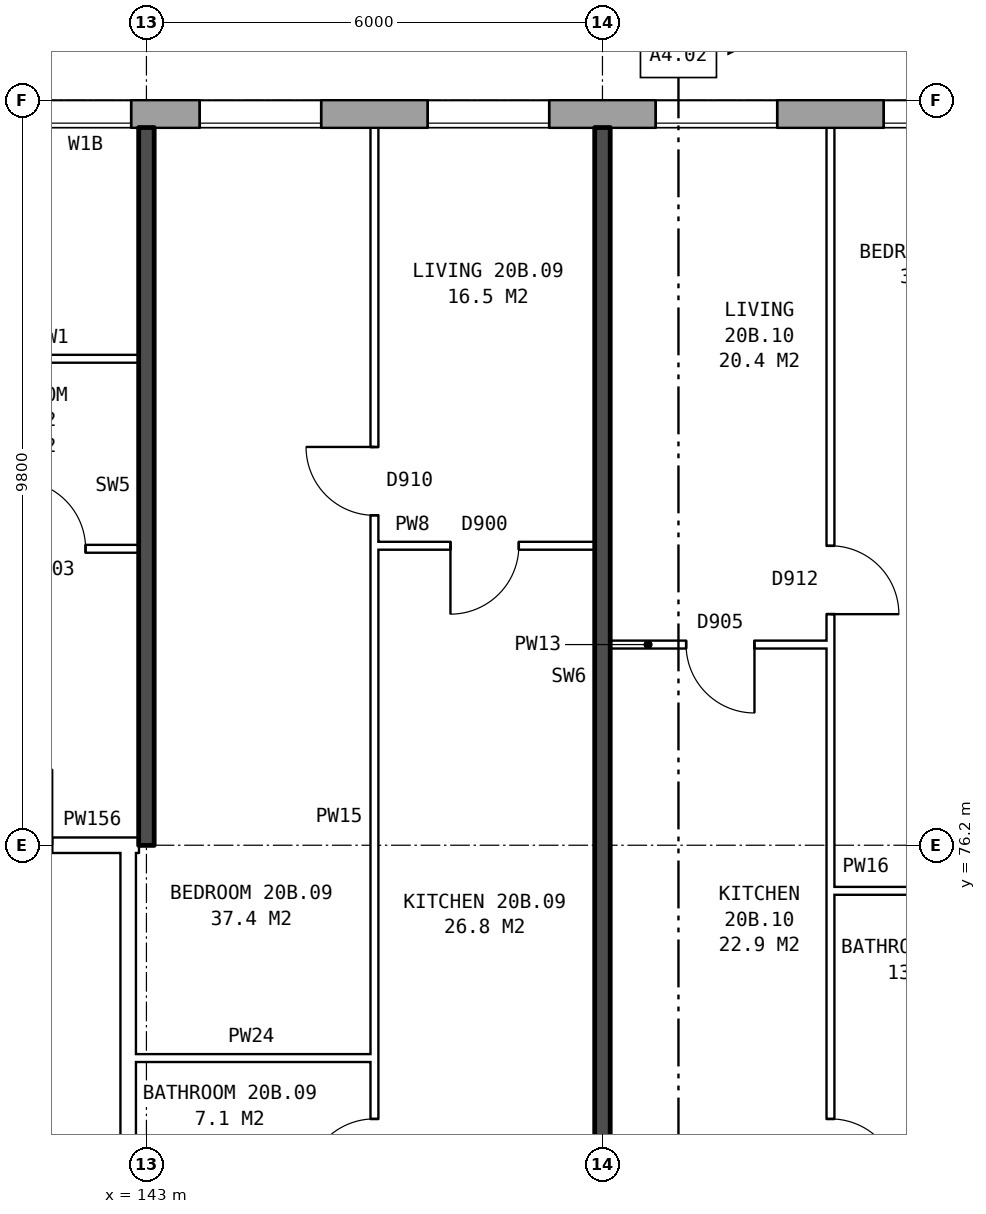
"""IFC4 building model, lengths in metres.
Left out: names, types, materials, properties, quantities, classifications, styles, units other than length and angle.
Written with IfcOpenShell. Run it as: python <this file> out.ifc"""

import sys

from ifc_helpers import new_model, si_unit, direction, frame, frame_2d, origin, place, context, subcontext, project, spatial, rectangle, extrude, element, fill, save


model = new_model("IFC4")
c1 = context("Model", 3, precision=1e-05, world=origin(), true_north=direction((0.0, 1.0)))
c2 = subcontext(c1, "Body", "Model", "MODEL_VIEW")
j1 = project(units=[si_unit("LENGTHUNIT", "METRE"), si_unit("PLANEANGLEUNIT", "RADIAN")], contexts=[c1])
p1 = place(None, origin())
s1 = spatial("IfcSite", under=j1, at=p1, CompositionType="ELEMENT")
p2 = place(p1, origin())
s2 = spatial("IfcBuilding", under=s1, at=p2, CompositionType="ELEMENT")
p3 = place(p2, frame((0.0, 0.0, 74.7)))
s3 = spatial("IfcBuildingStorey", under=s2, at=p3, CompositionType="ELEMENT", Elevation=74.7)
p4 = place(p3, frame((172.175, 85.82, 0.0), z_axis=(0.0, 0.0, 1.0), x_axis=(-1.0, 0.0, 0.0)))
e1 = element("IfcWall", 1, at=p4, inside=s3, PredefinedType="STANDARD", context=c2, shape_type="SweptSolid", body=[
    extrude(rectangle(XDim=38.101, YDim=0.36, at=frame_2d((19.05, 0.0))), origin(), (0.0, 0.0, 1.0), 2.85),
])
p5 = place(p4, frame((2.875, 0.0, 0.8)))
e2 = element("IfcOpeningElement", 2, at=p5, cuts=e1, PredefinedType="OPENING", context=c2, shape_type="SweptSolid", body=[
    extrude(rectangle(XDim=1.6, YDim=1.8, at=frame_2d((0.8, 0.9))), frame((0.0, 0.19, 0.0), z_axis=(0.0, -1.0, 0.0), x_axis=(1.0, 0.0, 0.0)), (0.0, 0.0, 1.0), 0.38),
])
p6 = place(p4, frame((6.525, 0.0, 0.8)))
e3 = element("IfcOpeningElement", 3, at=p6, cuts=e1, PredefinedType="OPENING", context=c2, shape_type="SweptSolid", body=[
    extrude(rectangle(XDim=0.6, YDim=0.9, at=frame_2d((0.3, 0.45))), frame((0.0, 0.19, 0.0), z_axis=(0.0, -1.0, 0.0), x_axis=(1.0, 0.0, 0.0)), (0.0, 0.0, 1.0), 0.38),
])
p7 = place(p4, frame((8.875, 0.0, 0.8)))
e4 = element("IfcOpeningElement", 4, at=p7, cuts=e1, PredefinedType="OPENING", context=c2, shape_type="SweptSolid", body=[
    extrude(rectangle(XDim=1.6, YDim=1.8, at=frame_2d((0.8, 0.9))), frame((0.0, 0.19, 0.0), z_axis=(0.0, -1.0, 0.0), x_axis=(1.0, 0.0, 0.0)), (0.0, 0.0, 1.0), 0.38),
])
p8 = place(p4, frame((11.875, 0.0, 0.8)))
e5 = element("IfcOpeningElement", 5, at=p8, cuts=e1, PredefinedType="OPENING", context=c2, shape_type="SweptSolid", body=[
    extrude(rectangle(XDim=1.6, YDim=1.8, at=frame_2d((0.8, 0.9))), frame((0.0, 0.19, 0.0), z_axis=(0.0, -1.0, 0.0), x_axis=(1.0, 0.0, 0.0)), (0.0, 0.0, 1.0), 0.38),
])
p9 = place(p4, frame((14.875, 0.0, 0.8)))
e6 = element("IfcOpeningElement", 6, at=p9, cuts=e1, PredefinedType="OPENING", context=c2, shape_type="SweptSolid", body=[
    extrude(rectangle(XDim=1.6, YDim=1.8, at=frame_2d((0.8, 0.9))), frame((0.0, 0.19, 0.0), z_axis=(0.0, -1.0, 0.0), x_axis=(1.0, 0.0, 0.0)), (0.0, 0.0, 1.0), 0.38),
])
p10 = place(p4, frame((17.875, 0.0, 0.8)))
e7 = element("IfcOpeningElement", 7, at=p10, cuts=e1, PredefinedType="OPENING", context=c2, shape_type="SweptSolid", body=[
    extrude(rectangle(XDim=1.6, YDim=1.8, at=frame_2d((0.8, 0.9))), frame((0.0, 0.19, 0.0), z_axis=(0.0, -1.0, 0.0), x_axis=(1.0, 0.0, 0.0)), (0.0, 0.0, 1.0), 0.38),
])
p11 = place(p4, frame((20.875, 0.0, 0.8)))
e8 = element("IfcOpeningElement", 8, at=p11, cuts=e1, PredefinedType="OPENING", context=c2, shape_type="SweptSolid", body=[
    extrude(rectangle(XDim=1.6, YDim=1.8, at=frame_2d((0.8, 0.9))), frame((0.0, 0.19, 0.0), z_axis=(0.0, -1.0, 0.0), x_axis=(1.0, 0.0, 0.0)), (0.0, 0.0, 1.0), 0.38),
])
p12 = place(p4, frame((23.875, 0.0, 0.8)))
e9 = element("IfcOpeningElement", 9, at=p12, cuts=e1, PredefinedType="OPENING", context=c2, shape_type="SweptSolid", body=[
    extrude(rectangle(XDim=1.6, YDim=1.8, at=frame_2d((0.8, 0.9))), frame((0.0, 0.19, 0.0), z_axis=(0.0, -1.0, 0.0), x_axis=(1.0, 0.0, 0.0)), (0.0, 0.0, 1.0), 0.38),
])
p13 = place(p4, frame((26.875, 0.0, 0.8)))
e10 = element("IfcOpeningElement", 10, at=p13, cuts=e1, PredefinedType="OPENING", context=c2, shape_type="SweptSolid", body=[
    extrude(rectangle(XDim=1.6, YDim=1.8, at=frame_2d((0.8, 0.9))), frame((0.0, 0.19, 0.0), z_axis=(0.0, -1.0, 0.0), x_axis=(1.0, 0.0, 0.0)), (0.0, 0.0, 1.0), 0.38),
])
p14 = place(p4, frame((29.375, 0.0, 0.8)))
e11 = element("IfcOpeningElement", 11, at=p14, cuts=e1, PredefinedType="OPENING", context=c2, shape_type="SweptSolid", body=[
    extrude(rectangle(XDim=1.2, YDim=1.8, at=frame_2d((0.6, 0.9))), frame((0.0, 0.19, 0.0), z_axis=(0.0, -1.0, 0.0), x_axis=(1.0, 0.0, 0.0)), (0.0, 0.0, 1.0), 0.38),
])
p15 = place(p4, frame((30.875, 0.0, 0.8)))
e12 = element("IfcOpeningElement", 12, at=p15, cuts=e1, PredefinedType="OPENING", context=c2, shape_type="SweptSolid", body=[
    extrude(rectangle(XDim=0.6, YDim=0.9, at=frame_2d((0.3, 0.45))), frame((0.0, 0.19, 0.0), z_axis=(0.0, -1.0, 0.0), x_axis=(1.0, 0.0, 0.0)), (0.0, 0.0, 1.0), 0.38),
])
p16 = place(p4, frame((35.875, 0.0, 0.8)))
e13 = element("IfcOpeningElement", 13, at=p16, cuts=e1, PredefinedType="OPENING", context=c2, shape_type="SweptSolid", body=[
    extrude(rectangle(XDim=1.6, YDim=1.8, at=frame_2d((0.8, 0.9))), frame((0.0, 0.19, 0.0), z_axis=(0.0, -1.0, 0.0), x_axis=(1.0, 0.0, 0.0)), (0.0, 0.0, 1.0), 0.38),
])
p17 = place(p4, frame((7.425, 0.0, 0.8)))
e14 = element("IfcOpeningElement", 14, at=p17, cuts=e1, PredefinedType="OPENING", context=c2, shape_type="SweptSolid", body=[
    extrude(rectangle(XDim=1.0, YDim=1.8, at=frame_2d((0.5, 0.9))), frame((0.0, 0.19, 0.0), z_axis=(0.0, -1.0, 0.0), x_axis=(1.0, 0.0, 0.0)), (0.0, 0.0, 1.0), 0.38),
])
p18 = place(p4, frame((32.725, 0.0, 1.7)))
e15 = element("IfcOpeningElement", 15, at=p18, cuts=e1, PredefinedType="OPENING", context=c2, shape_type="SweptSolid", body=[
    extrude(rectangle(XDim=0.6, YDim=0.9, at=frame_2d((0.3, 0.45))), frame((0.0, 0.19, 0.0), z_axis=(0.0, -1.0, 0.0), x_axis=(1.0, 0.0, 0.0)), (0.0, 0.0, 1.0), 0.38),
])
p19 = place(p4, frame((33.625, 0.0, 0.8)))
e16 = element("IfcOpeningElement", 16, at=p19, cuts=e1, PredefinedType="OPENING", context=c2, shape_type="SweptSolid", body=[
    extrude(rectangle(XDim=1.2, YDim=1.8, at=frame_2d((0.6, 0.9))), frame((0.0, 0.19, 0.0), z_axis=(0.0, -1.0, 0.0), x_axis=(1.0, 0.0, 0.0)), (0.0, 0.0, 1.0), 0.38),
])
p20 = place(p3, frame((142.76, 63.9, 0.0), z_axis=(0.0, 0.0, 1.0), x_axis=(0.0, 1.0, 0.0)))
e17 = element("IfcWall", 17, at=p20, inside=s3, PredefinedType="PARTITIONING", context=c2, shape_type="SweptSolid", body=[
    extrude(rectangle(XDim=12.2, YDim=0.2, at=frame_2d((6.1, 0.0))), origin(), (0.0, 0.0, 1.0), 2.85),
])
p21 = place(p20, frame((5.1, 0.0, 0.0)))
e18 = element("IfcOpeningElement", 18, at=p21, cuts=e17, PredefinedType="OPENING", context=c2, shape_type="SweptSolid", body=[
    extrude(rectangle(XDim=2.0, YDim=2.1, at=frame_2d((1.0, 1.05))), frame((0.0, 0.11, 0.0), z_axis=(0.0, -1.0, 0.0), x_axis=(1.0, 0.0, 0.0)), (0.0, 0.0, 1.0), 0.22),
])
p22 = place(p3, frame((142.76, 73.4, 0.0), z_axis=(0.0, 0.0, 1.0), x_axis=(1.0, 0.0, 0.0)))
e19 = element("IfcWall", 19, at=p22, inside=s3, PredefinedType="PARTITIONING", context=c2, shape_type="SweptSolid", body=[
    extrude(rectangle(XDim=3.24, YDim=0.1, at=frame_2d((1.62, 0.0))), origin(), (0.0, 0.0, 1.0), 2.85),
])
p23 = place(p3, frame((152.0, 75.6, 0.0), z_axis=(0.0, 0.0, 1.0), x_axis=(1.0, 0.0, 0.0)))
e20 = element("IfcWall", 20, at=p23, inside=s3, PredefinedType="PARTITIONING", context=c2, shape_type="SweptSolid", body=[
    extrude(rectangle(XDim=2.9, YDim=0.1, at=frame_2d((1.45, 0.0))), origin(), (0.0, 0.0, 1.0), 2.85),
])
p24 = place(p3, frame((139.76, 76.2, 0.0), z_axis=(0.0, 0.0, 1.0), x_axis=(1.0, 0.0, 0.0)))
e21 = element("IfcWall", 21, at=p24, inside=s3, PredefinedType="PARTITIONING", context=c2, shape_type="SweptSolid", body=[
    extrude(rectangle(XDim=3.0, YDim=0.2, at=frame_2d((1.5, 0.0))), origin(), (0.0, 0.0, 1.0), 2.85),
])
p25 = place(p24, frame((1.0, 0.0, 0.0)))
e22 = element("IfcOpeningElement", 22, at=p25, cuts=e21, PredefinedType="OPENING", context=c2, shape_type="SweptSolid", body=[
    extrude(rectangle(XDim=1.0, YDim=2.1, at=frame_2d((0.5, 1.05))), frame((0.0, 0.11, 0.0), z_axis=(0.0, -1.0, 0.0), x_axis=(1.0, 0.0, 0.0)), (0.0, 0.0, 1.0), 0.22),
])
p26 = place(p3, frame((142.76, 76.2, 0.0), z_axis=(0.0, 0.0, 1.0), x_axis=(1.0, 0.0, 0.0)))
e23 = element("IfcWall", 23, at=p26, inside=s3, PredefinedType="PARTITIONING", context=c2, shape_type="SweptSolid", body=[
    extrude(rectangle(XDim=0.14, YDim=0.2, at=frame_2d((0.07, 0.0))), origin(), (0.0, 0.0, 1.0), 2.85),
])
p27 = place(p3, frame((149.1, 78.84, 0.0), z_axis=(0.0, 0.0, 1.0), x_axis=(1.0, 0.0, 0.0)))
e24 = element("IfcWall", 24, at=p27, inside=s3, PredefinedType="PARTITIONING", context=c2, shape_type="SweptSolid", body=[
    extrude(rectangle(XDim=2.9, YDim=0.1, at=frame_2d((1.45, 0.0))), origin(), (0.0, 0.0, 1.0), 2.85),
])
p28 = place(p27, frame((1.0, 0.0, 0.0)))
e25 = element("IfcOpeningElement", 25, at=p28, cuts=e24, PredefinedType="OPENING", context=c2, shape_type="SweptSolid", body=[
    extrude(rectangle(XDim=0.9, YDim=2.1, at=frame_2d((0.45, 1.05))), frame((0.0, 0.06, 0.0), z_axis=(0.0, -1.0, 0.0), x_axis=(1.0, 0.0, 0.0)), (0.0, 0.0, 1.0), 0.12),
])
p29 = place(p3, frame((137.1, 80.1, 0.0), z_axis=(0.0, 0.0, 1.0), x_axis=(1.0, 0.0, 0.0)))
e26 = element("IfcWall", 26, at=p29, inside=s3, PredefinedType="PARTITIONING", context=c2, shape_type="SweptSolid", body=[
    extrude(rectangle(XDim=5.8, YDim=0.1, at=frame_2d((2.9, 0.0))), origin(), (0.0, 0.0, 1.0), 2.85),
])
p30 = place(p29, frame((1.3, 0.0, 0.0)))
e27 = element("IfcOpeningElement", 27, at=p30, cuts=e26, PredefinedType="OPENING", context=c2, shape_type="SweptSolid", body=[
    extrude(rectangle(XDim=0.9, YDim=2.1, at=frame_2d((0.45, 1.05))), frame((0.0, 0.06, 0.0), z_axis=(0.0, -1.0, 0.0), x_axis=(1.0, 0.0, 0.0)), (0.0, 0.0, 1.0), 0.12),
])
p31 = place(p29, frame((4.2, 0.0, 0.0)))
e28 = element("IfcOpeningElement", 28, at=p31, cuts=e26, PredefinedType="OPENING", context=c2, shape_type="SweptSolid", body=[
    extrude(rectangle(XDim=0.9, YDim=2.1, at=frame_2d((0.45, 1.05))), frame((0.0, 0.06, 0.0), z_axis=(0.0, -1.0, 0.0), x_axis=(1.0, 0.0, 0.0)), (0.0, 0.0, 1.0), 0.12),
])
p32 = place(p3, frame((146.0, 80.14, 0.0), z_axis=(0.0, 0.0, 1.0), x_axis=(1.0, 0.0, 0.0)))
e29 = element("IfcWall", 29, at=p32, inside=s3, PredefinedType="PARTITIONING", context=c2, shape_type="SweptSolid", body=[
    extrude(rectangle(XDim=2.9, YDim=0.1, at=frame_2d((1.45, 0.0))), origin(), (0.0, 0.0, 1.0), 2.85),
])
p33 = place(p32, frame((1.0, 0.0, 0.0)))
e30 = element("IfcOpeningElement", 30, at=p33, cuts=e29, PredefinedType="OPENING", context=c2, shape_type="SweptSolid", body=[
    extrude(rectangle(XDim=0.9, YDim=2.1, at=frame_2d((0.45, 1.05))), frame((0.0, 0.06, 0.0), z_axis=(0.0, -1.0, 0.0), x_axis=(1.0, 0.0, 0.0)), (0.0, 0.0, 1.0), 0.12),
])
p34 = place(p3, frame((140.6, 82.6, 0.0), z_axis=(0.0, 0.0, 1.0), x_axis=(1.0, 0.0, 0.0)))
e31 = element("IfcWall", 31, at=p34, inside=s3, PredefinedType="PARTITIONING", context=c2, shape_type="SweptSolid", body=[
    extrude(rectangle(XDim=2.3, YDim=0.1, at=frame_2d((1.15, 0.0))), origin(), (0.0, 0.0, 1.0), 2.85),
])
p35 = place(p3, frame((143.0, 76.2, 0.0), z_axis=(0.0, 0.0, 1.0), x_axis=(0.0, 1.0, 0.0)))
e32 = element("IfcWall", 32, at=p35, inside=s3, PredefinedType="SOLIDWALL", context=c2, shape_type="SweptSolid", body=[
    extrude(rectangle(XDim=9.44, YDim=0.2, at=frame_2d((4.72, 0.0))), origin(), (0.0, 0.0, 1.0), 2.85),
])
p36 = place(p3, frame((146.0, 71.3, 0.0), z_axis=(0.0, 0.0, 1.0), x_axis=(0.0, 1.0, 0.0)))
e33 = element("IfcWall", 33, at=p36, inside=s3, PredefinedType="PARTITIONING", context=c2, shape_type="SweptSolid", body=[
    extrude(rectangle(XDim=14.34, YDim=0.1, at=frame_2d((7.17, 0.0))), origin(), (0.0, 0.0, 1.0), 2.85),
])
p37 = place(p36, frame((9.24, 0.0, 0.0)))
e34 = element("IfcOpeningElement", 34, at=p37, cuts=e33, PredefinedType="OPENING", context=c2, shape_type="SweptSolid", body=[
    extrude(rectangle(XDim=0.9, YDim=2.1, at=frame_2d((0.45, 1.05))), frame((0.0, 0.06, 0.0), z_axis=(0.0, -1.0, 0.0), x_axis=(1.0, 0.0, 0.0)), (0.0, 0.0, 1.0), 0.12),
])
p38 = place(p36, frame((0.4, 0.0, 0.0)))
e35 = element("IfcOpeningElement", 35, at=p38, cuts=e33, PredefinedType="OPENING", context=c2, shape_type="SweptSolid", body=[
    extrude(rectangle(XDim=0.9, YDim=2.1, at=frame_2d((0.45, 1.05))), frame((0.0, 0.06, 0.0), z_axis=(0.0, -1.0, 0.0), x_axis=(1.0, 0.0, 0.0)), (0.0, 0.0, 1.0), 0.12),
])
p39 = place(p3, frame((149.0, 71.2, 0.0), z_axis=(0.0, 0.0, 1.0), x_axis=(0.0, 1.0, 0.0)))
e36 = element("IfcWall", 36, at=p39, inside=s3, PredefinedType="SOLIDWALL", context=c2, shape_type="SweptSolid", body=[
    extrude(rectangle(XDim=14.44, YDim=0.2, at=frame_2d((7.22, 0.0))), origin(), (0.0, 0.0, 1.0), 2.85),
])
p40 = place(p3, frame((152.0, 71.3, 0.0), z_axis=(0.0, 0.0, 1.0), x_axis=(0.0, 1.0, 0.0)))
e37 = element("IfcWall", 37, at=p40, inside=s3, PredefinedType="PARTITIONING", context=c2, shape_type="SweptSolid", body=[
    extrude(rectangle(XDim=14.34, YDim=0.1, at=frame_2d((7.17, 0.0))), origin(), (0.0, 0.0, 1.0), 2.85),
])
p41 = place(p40, frame((7.94, 0.0, 0.0)))
e38 = element("IfcOpeningElement", 38, at=p41, cuts=e37, PredefinedType="OPENING", context=c2, shape_type="SweptSolid", body=[
    extrude(rectangle(XDim=0.9, YDim=2.1, at=frame_2d((0.45, 1.05))), frame((0.0, 0.06, 0.0), z_axis=(0.0, -1.0, 0.0), x_axis=(1.0, 0.0, 0.0)), (0.0, 0.0, 1.0), 0.12),
])
p42 = place(p40, frame((0.4, 0.0, 0.0)))
e39 = element("IfcOpeningElement", 39, at=p42, cuts=e37, PredefinedType="OPENING", context=c2, shape_type="SweptSolid", body=[
    extrude(rectangle(XDim=0.9, YDim=2.1, at=frame_2d((0.45, 1.05))), frame((0.0, 0.06, 0.0), z_axis=(0.0, -1.0, 0.0), x_axis=(1.0, 0.0, 0.0)), (0.0, 0.0, 1.0), 0.12),
])
p43 = place(p10, origin())
e40 = element("IfcWindow", 40, at=p43, inside=s3, PartitioningType="SINGLE_PANEL", PredefinedType="WINDOW", context=c2, shape_type="SweptSolid", body=[
    extrude(rectangle(XDim=1.6, YDim=1.8, at=frame_2d((0.8, 0.9))), frame((0.0, 0.15, 0.0), z_axis=(0.0, -1.0, 0.0), x_axis=(1.0, 0.0, 0.0)), (0.0, 0.0, 1.0), 0.06),
])
fill(e7, e40)
p44 = place(p11, origin())
e41 = element("IfcWindow", 41, at=p44, inside=s3, PartitioningType="SINGLE_PANEL", PredefinedType="WINDOW", context=c2, shape_type="SweptSolid", body=[
    extrude(rectangle(XDim=1.6, YDim=1.8, at=frame_2d((0.8, 0.9))), frame((0.0, 0.15, 0.0), z_axis=(0.0, -1.0, 0.0), x_axis=(1.0, 0.0, 0.0)), (0.0, 0.0, 1.0), 0.06),
])
fill(e8, e41)
p45 = place(p12, origin())
e42 = element("IfcWindow", 42, at=p45, inside=s3, PartitioningType="SINGLE_PANEL", PredefinedType="WINDOW", context=c2, shape_type="SweptSolid", body=[
    extrude(rectangle(XDim=1.6, YDim=1.8, at=frame_2d((0.8, 0.9))), frame((0.0, 0.15, 0.0), z_axis=(0.0, -1.0, 0.0), x_axis=(1.0, 0.0, 0.0)), (0.0, 0.0, 1.0), 0.06),
])
fill(e9, e42)
p46 = place(p13, origin())
e43 = element("IfcWindow", 43, at=p46, inside=s3, PartitioningType="SINGLE_PANEL", PredefinedType="WINDOW", context=c2, shape_type="SweptSolid", body=[
    extrude(rectangle(XDim=1.6, YDim=1.8, at=frame_2d((0.8, 0.9))), frame((0.0, 0.15, 0.0), z_axis=(0.0, -1.0, 0.0), x_axis=(1.0, 0.0, 0.0)), (0.0, 0.0, 1.0), 0.06),
])
fill(e10, e43)
p47 = place(p14, origin())
e44 = element("IfcWindow", 44, at=p47, inside=s3, PartitioningType="SINGLE_PANEL", PredefinedType="WINDOW", context=c2, shape_type="SweptSolid", body=[
    extrude(rectangle(XDim=1.2, YDim=1.8, at=frame_2d((0.6, 0.9))), frame((0.0, 0.15, 0.0), z_axis=(0.0, -1.0, 0.0), x_axis=(1.0, 0.0, 0.0)), (0.0, 0.0, 1.0), 0.06),
])
fill(e11, e44)
p48 = place(p31, origin())
e45 = element("IfcDoor", 45, at=p48, inside=s3, OperationType="SINGLE_SWING_LEFT", PredefinedType="DOOR", context=c2, shape_type="SweptSolid", body=[
    extrude(rectangle(XDim=0.9, YDim=2.1, at=frame_2d((0.45, 1.05))), frame((0.0, 0.025, 0.0), z_axis=(0.0, -1.0, 0.0), x_axis=(1.0, 0.0, 0.0)), (0.0, 0.0, 1.0), 0.05),
])
fill(e28, e45)
p49 = place(p37, origin())
e46 = element("IfcDoor", 46, at=p49, inside=s3, OperationType="SINGLE_SWING_RIGHT", PredefinedType="DOOR", context=c2, shape_type="SweptSolid", body=[
    extrude(rectangle(XDim=0.9, YDim=2.1, at=frame_2d((0.45, 1.05))), frame((0.0, 0.025, 0.0), z_axis=(0.0, -1.0, 0.0), x_axis=(1.0, 0.0, 0.0)), (0.0, 0.0, 1.0), 0.05),
])
fill(e34, e46)
p50 = place(p33, frame((0.9, 0.0, 0.0), z_axis=(0.0, 0.0, 1.0), x_axis=(-1.0, 0.0, 0.0)))
e47 = element("IfcDoor", 47, at=p50, inside=s3, OperationType="SINGLE_SWING_RIGHT", PredefinedType="DOOR", context=c2, shape_type="SweptSolid", body=[
    extrude(rectangle(XDim=0.9, YDim=2.1, at=frame_2d((0.45, 1.05))), frame((0.0, 0.025, 0.0), z_axis=(0.0, -1.0, 0.0), x_axis=(1.0, 0.0, 0.0)), (0.0, 0.0, 1.0), 0.05),
])
fill(e30, e47)
p51 = place(p38, origin())
e48 = element("IfcDoor", 48, at=p51, inside=s3, OperationType="SINGLE_SWING_LEFT", PredefinedType="DOOR", context=c2, shape_type="SweptSolid", body=[
    extrude(rectangle(XDim=0.9, YDim=2.1, at=frame_2d((0.45, 1.05))), frame((0.0, 0.025, 0.0), z_axis=(0.0, -1.0, 0.0), x_axis=(1.0, 0.0, 0.0)), (0.0, 0.0, 1.0), 0.05),
])
fill(e35, e48)
p52 = place(p41, frame((0.9, 0.0, 0.0), z_axis=(0.0, 0.0, 1.0), x_axis=(-1.0, 0.0, 0.0)))
e49 = element("IfcDoor", 49, at=p52, inside=s3, OperationType="SINGLE_SWING_RIGHT", PredefinedType="DOOR", context=c2, shape_type="SweptSolid", body=[
    extrude(rectangle(XDim=0.9, YDim=2.1, at=frame_2d((0.45, 1.05))), frame((0.0, 0.025, 0.0), z_axis=(0.0, -1.0, 0.0), x_axis=(1.0, 0.0, 0.0)), (0.0, 0.0, 1.0), 0.05),
])
fill(e38, e49)
p53 = place(p28, frame((0.9, 0.0, 0.0), z_axis=(0.0, 0.0, 1.0), x_axis=(-1.0, 0.0, 0.0)))
e50 = element("IfcDoor", 50, at=p53, inside=s3, OperationType="SINGLE_SWING_LEFT", PredefinedType="DOOR", context=c2, shape_type="SweptSolid", body=[
    extrude(rectangle(XDim=0.9, YDim=2.1, at=frame_2d((0.45, 1.05))), frame((0.0, 0.025, 0.0), z_axis=(0.0, -1.0, 0.0), x_axis=(1.0, 0.0, 0.0)), (0.0, 0.0, 1.0), 0.05),
])
fill(e25, e50)
p54 = place(p42, frame((0.9, 0.0, 0.0), z_axis=(0.0, 0.0, 1.0), x_axis=(-1.0, 0.0, 0.0)))
e51 = element("IfcDoor", 51, at=p54, inside=s3, OperationType="SINGLE_SWING_RIGHT", PredefinedType="DOOR", context=c2, shape_type="SweptSolid", body=[
    extrude(rectangle(XDim=0.9, YDim=2.1, at=frame_2d((0.45, 1.05))), frame((0.0, 0.025, 0.0), z_axis=(0.0, -1.0, 0.0), x_axis=(1.0, 0.0, 0.0)), (0.0, 0.0, 1.0), 0.05),
])
fill(e39, e51)
save(model, sys.argv[1])
